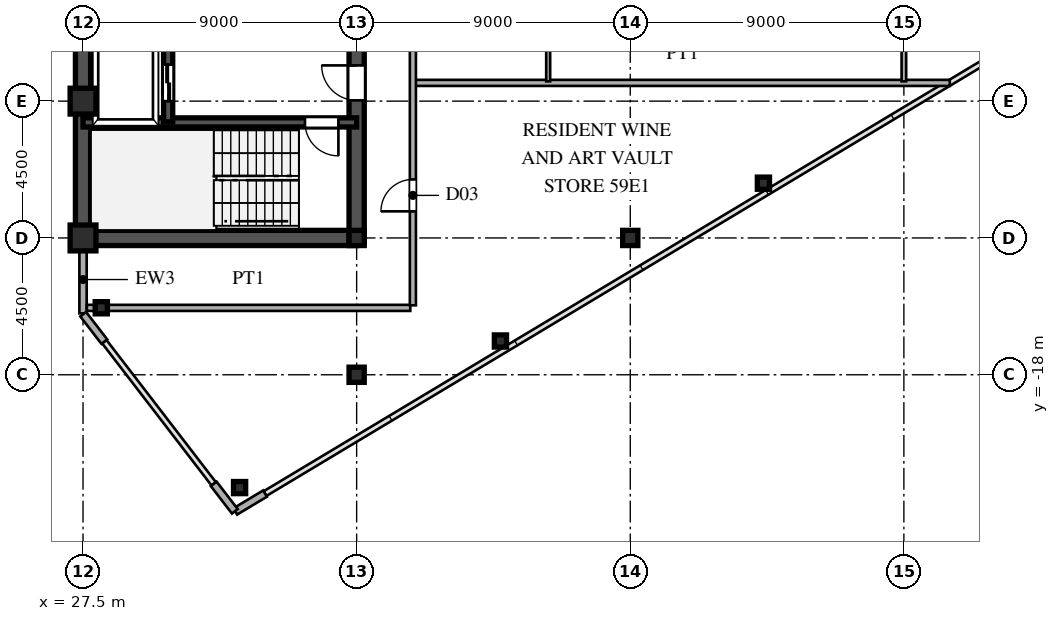
"""IFC4 building model, lengths in metres.
Left out: names, types, materials, properties, quantities, classifications, styles, units other than length and angle.
Written with IfcOpenShell. Run it as: python <this file> out.ifc"""

import sys

from ifc_helpers import new_model, si_unit, direction, frame, frame_2d, origin, origin_2d, place, context, subcontext, project, spatial, rectangle, hollow_rectangle, i_section, extrude, source, transform, mapped, element, fill, save


model = new_model("IFC4")
c1 = context("Model", 3, precision=1e-05, world=origin(), true_north=direction((0.0, 1.0)))
c2 = subcontext(c1, "Body", "Model", "MODEL_VIEW")
j1 = project(units=[si_unit("LENGTHUNIT", "METRE"), si_unit("PLANEANGLEUNIT", "RADIAN")], contexts=[c1])
p1 = place(None, origin())
s1 = spatial("IfcSite", under=j1, at=p1, CompositionType="ELEMENT")
p2 = place(p1, origin())
s2 = spatial("IfcBuilding", under=s1, at=p2, CompositionType="ELEMENT")
p3 = place(p2, frame((0.0, 0.0, 221.1)))
s3 = spatial("IfcBuildingStorey", under=s2, at=p3, CompositionType="ELEMENT", Elevation=221.1)
m1 = source(origin(), c2, "Body", "SweptSolid", [
    extrude(hollow_rectangle(XDim=0.85, YDim=0.85, WallThickness=0.036, at=origin_2d()), origin(), (0.0, 0.0, 1.0), 3.6),
])
for number, where, z_axis, x_axis in (
    (1, (27.5, -13.5, 0.0), (0.0, 0.0, 1.0), (1.0, 0.0, 0.0)),
    (2, (27.5, -9.0, 0.0), (0.0, 0.0, 1.0), (1.0, 0.0, 0.0)),
):
    element("IfcColumn", number, at=place(p3, frame(where, z_axis=z_axis, x_axis=x_axis)), inside=s3, PredefinedType="COLUMN", context=c2, shape_type="MappedRepresentation", body=[
        mapped(m1, transform((0.0, 0.0, 0.0), scale=1.0)),
    ])
m2 = source(origin(), c2, "Body", "SweptSolid", [
    extrude(i_section(OverallWidth=0.5, OverallDepth=0.5, WebThickness=0.02, FlangeThickness=0.032, at=origin_2d()), origin(), (0.0, 0.0, 1.0), 3.6),
])
for number, where, z_axis, x_axis in (
    (3, (36.5, -18.0, 0.0), (0.0, 0.0, 1.0), (1.0, 0.0, 0.0)),
    (4, (36.5, -13.5, 0.0), (0.0, 0.0, 1.0), (1.0, 0.0, 0.0)),
    (5, (45.5, -13.5, 0.0), (0.0, 0.0, 1.0), (1.0, 0.0, 0.0)),
):
    element("IfcColumn", number, at=place(p3, frame(where, z_axis=z_axis, x_axis=x_axis)), inside=s3, PredefinedType="COLUMN", context=c2, shape_type="MappedRepresentation", body=[
        mapped(m2, transform((0.0, 0.0, 0.0), scale=1.0)),
    ])
m3 = source(origin(), c2, "Body", "SweptSolid", [
    extrude(hollow_rectangle(XDim=0.4, YDim=0.4, WallThickness=0.016, at=origin_2d()), origin(), (0.0, 0.0, 1.0), 3.6),
])
for number, where, z_axis, x_axis in (
    (6, (32.65, -21.71, 0.0), (0.0, 0.0, 1.0), (1.0, 0.0, 0.0)),
    (7, (28.1, -15.796, 0.0), (0.0, 0.0, 1.0), (1.0, 0.0, 0.0)),
    (8, (41.23, -16.889, 0.0), (0.0, 0.0, 1.0), (1.0, 0.0, 0.0)),
    (9, (49.88, -11.699, 0.0), (0.0, 0.0, 1.0), (1.0, 0.0, 0.0)),
):
    element("IfcColumn", number, at=place(p3, frame(where, z_axis=z_axis, x_axis=x_axis)), inside=s3, PredefinedType="COLUMN", context=c2, shape_type="MappedRepresentation", body=[
        mapped(m3, transform((0.0, 0.0, 0.0), scale=1.0)),
    ])
p4 = place(p3, frame((32.509, -22.495, 0.0), z_axis=(0.0, 0.0, 1.0), x_axis=(0.85743623509, 0.514590228002, 0.0)))
e10 = element("IfcWall", 10, at=p4, inside=s3, PredefinedType="SOLIDWALL", context=c2, shape_type="SweptSolid", body=[
    extrude(rectangle(XDim=1.14, YDim=0.24, at=frame_2d((0.57, 0.0))), origin(), (0.0, 0.0, 1.0), 3.34),
])
p5 = place(p3, frame((27.5, -15.98, 0.0), z_axis=(0.0, 0.0, 1.0), x_axis=(0.0, 1.0, 0.0)))
e11 = element("IfcWall", 11, at=p5, inside=s3, PredefinedType="SOLIDWALL", context=c2, shape_type="SweptSolid", body=[
    extrude(rectangle(XDim=1.605, YDim=0.24, at=frame_2d((0.803, 0.0))), origin(), (0.0, 0.0, 1.0), 3.34),
])
p6 = place(p3, frame((27.5, -14.375, 0.0), z_axis=(0.0, 0.0, 1.0), x_axis=(0.0, 1.0, 0.0)))
e12 = element("IfcWall", 12, at=p6, inside=s3, PredefinedType="SOLIDWALL", context=c2, shape_type="SweptSolid", body=[
    extrude(rectangle(XDim=0.62, YDim=0.24, at=frame_2d((0.31, 0.0))), origin(), (0.0, 0.0, 1.0), 2.84),
])
for number, where, z_axis, x_axis in (
    (13, (27.506, -16.008, 0.0), (0.0, 0.0, 1.0), (0.61, -0.793, 0.0)),
    (14, (31.799, -21.588, 0.0), (0.0, 0.0, 1.0), (0.61, -0.793, 0.0)),
):
    element("IfcWall", number, at=place(p3, frame(where, z_axis=z_axis, x_axis=x_axis)), inside=s3, PredefinedType="SOLIDWALL", context=c2, shape_type="SweptSolid", body=[
        extrude(rectangle(XDim=1.14, YDim=0.24, at=frame_2d((0.57, 0.0))), origin(), (0.0, 0.0, 1.0), 3.34),
    ])
p7 = place(p3, frame((27.5, -13.5, 0.0), z_axis=(0.0, 0.0, 1.0), x_axis=(0.0, 1.0, 0.0)))
e15 = element("IfcWall", 15, at=p7, inside=s3, PredefinedType="SHEAR", context=c2, shape_type="SweptSolid", body=[
    extrude(rectangle(XDim=12.2, YDim=0.5, at=frame_2d((6.1, 0.0))), origin(), (0.0, 0.0, 1.0), 3.34),
])
p8 = place(p3, frame((27.5, -13.5, 0.0), z_axis=(0.0, 0.0, 1.0), x_axis=(1.0, 0.0, 0.0)))
e16 = element("IfcWall", 16, at=p8, inside=s3, PredefinedType="SHEAR", context=c2, shape_type="SweptSolid", body=[
    extrude(rectangle(XDim=9.0, YDim=0.5, at=frame_2d((4.5, 0.0))), origin(), (0.0, 0.0, 1.0), 3.34),
])
p9 = place(p3, frame((36.5, -13.65, 0.0), z_axis=(0.0, 0.0, 1.0), x_axis=(0.0, 1.0, 0.0)))
e17 = element("IfcWall", 17, at=p9, inside=s3, PredefinedType="SHEAR", context=c2, shape_type="SweptSolid", body=[
    extrude(rectangle(XDim=7.15, YDim=0.5, at=frame_2d((3.575, 0.0))), origin(), (0.0, 0.0, 1.0), 3.34),
])
p10 = place(p9, frame((4.675, 0.0, 0.0)))
e18 = element("IfcOpeningElement", 18, at=p10, cuts=e17, PredefinedType="OPENING", context=c2, shape_type="SweptSolid", body=[
    extrude(rectangle(XDim=1.15, YDim=2.2, at=frame_2d((0.575, 1.1))), frame((0.0, 0.26, 0.0), z_axis=(0.0, -1.0, 0.0), x_axis=(1.0, 0.0, 0.0)), (0.0, 0.0, 1.0), 0.52),
])
p11 = place(p3, frame((27.5, -9.7, 0.0), z_axis=(0.0, 0.0, 1.0), x_axis=(1.0, 0.0, 0.0)))
e19 = element("IfcWall", 19, at=p11, inside=s3, PredefinedType="SHEAR", context=c2, shape_type="SweptSolid", body=[
    extrude(rectangle(XDim=9.0, YDim=0.3, at=frame_2d((4.5, 0.0))), origin(), (0.0, 0.0, 1.0), 3.34),
])
p12 = place(p11, frame((7.3, 0.0, 0.0)))
e20 = element("IfcOpeningElement", 20, at=p12, cuts=e19, PredefinedType="OPENING", context=c2, shape_type="SweptSolid", body=[
    extrude(rectangle(XDim=1.1, YDim=2.2, at=frame_2d((0.55, 1.1))), frame((0.0, 0.16, 0.0), z_axis=(0.0, -1.0, 0.0), x_axis=(1.0, 0.0, 0.0)), (0.0, 0.0, 1.0), 0.32),
])
p13 = place(p3, frame((30.3, -9.68, 0.0), z_axis=(0.0, 0.0, 1.0), x_axis=(0.0, 1.0, 0.0)))
e21 = element("IfcWall", 21, at=p13, inside=s3, PredefinedType="SHEAR", context=c2, shape_type="SweptSolid", body=[
    extrude(rectangle(XDim=2.56, YDim=0.3, at=frame_2d((1.28, 0.0))), origin(), (0.0, 0.0, 1.0), 3.34),
])
p14 = place(p13, frame((0.68, 0.0, 0.0)))
e22 = element("IfcOpeningElement", 22, at=p14, cuts=e21, PredefinedType="OPENING", context=c2, shape_type="SweptSolid", body=[
    extrude(rectangle(XDim=1.2, YDim=2.25, at=frame_2d((0.6, 1.125))), frame((0.0, 0.16, 0.0), z_axis=(0.0, -1.0, 0.0), x_axis=(1.0, 0.0, 0.0)), (0.0, 0.0, 1.0), 0.32),
])
p15 = place(p3, frame((27.625, -15.8, 0.0), z_axis=(0.0, 0.0, 1.0), x_axis=(1.0, 0.0, 0.0)))
e23 = element("IfcWall", 23, at=p15, inside=s3, PredefinedType="PARTITIONING", context=c2, shape_type="SweptSolid", body=[
    extrude(rectangle(XDim=10.64, YDim=0.2, at=frame_2d((5.32, 0.0))), origin(), (0.0, 0.0, 1.0), 3.34),
])
p16 = place(p3, frame((38.43, -8.4, 0.0), z_axis=(0.0, 0.0, 1.0), x_axis=(1.0, 0.0, 0.0)))
e24 = element("IfcWall", 24, at=p16, inside=s3, PredefinedType="PARTITIONING", context=c2, shape_type="SweptSolid", body=[
    extrude(rectangle(XDim=17.58, YDim=0.2, at=frame_2d((8.79, 0.0))), origin(), (0.0, 0.0, 1.0), 3.34),
])
p17 = place(p3, frame((38.35, -15.715, 0.0), z_axis=(0.0, 0.0, 1.0), x_axis=(0.0, 1.0, 0.0)))
e25 = element("IfcWall", 25, at=p17, inside=s3, PredefinedType="PARTITIONING", context=c2, shape_type="SweptSolid", body=[
    extrude(rectangle(XDim=31.43, YDim=0.2, at=frame_2d((15.715, 0.0))), origin(), (0.0, 0.0, 1.0), 3.34),
])
p18 = place(p17, frame((3.09, 0.0, 0.0)))
e26 = element("IfcOpeningElement", 26, at=p18, cuts=e25, PredefinedType="OPENING", context=c2, shape_type="SweptSolid", body=[
    extrude(rectangle(XDim=1.05, YDim=2.25, at=frame_2d((0.525, 1.125))), frame((0.0, 0.11, 0.0), z_axis=(0.0, -1.0, 0.0), x_axis=(1.0, 0.0, 0.0)), (0.0, 0.0, 1.0), 0.22),
])
p19 = place(p17, frame((13.289, 0.0, 0.0)))
e27 = element("IfcOpeningElement", 27, at=p19, cuts=e25, PredefinedType="OPENING", context=c2, shape_type="SweptSolid", body=[
    extrude(rectangle(XDim=1.05, YDim=2.25, at=frame_2d((0.525, 1.125))), frame((0.0, 0.11, 0.0), z_axis=(0.0, -1.0, 0.0), x_axis=(1.0, 0.0, 0.0)), (0.0, 0.0, 1.0), 0.22),
])
p20 = place(p17, frame((25.59, 0.0, 0.0)))
e28 = element("IfcOpeningElement", 28, at=p20, cuts=e25, PredefinedType="OPENING", context=c2, shape_type="SweptSolid", body=[
    extrude(rectangle(XDim=1.05, YDim=2.25, at=frame_2d((0.525, 1.125))), frame((0.0, 0.11, 0.0), z_axis=(0.0, -1.0, 0.0), x_axis=(1.0, 0.0, 0.0)), (0.0, 0.0, 1.0), 0.22),
])
p21 = place(p3, frame((42.8, -8.35, 0.0), z_axis=(0.0, 0.0, 1.0), x_axis=(0.0, 1.0, 0.0)))
e29 = element("IfcWall", 29, at=p21, inside=s3, PredefinedType="PARTITIONING", context=c2, shape_type="SweptSolid", body=[
    extrude(rectangle(XDim=8.833, YDim=0.13, at=frame_2d((4.417, 0.0))), origin(), (0.0, 0.0, 1.0), 3.34),
])
p22 = place(p21, frame((6.175, 0.0, 0.0)))
e30 = element("IfcOpeningElement", 30, at=p22, cuts=e29, PredefinedType="OPENING", context=c2, shape_type="SweptSolid", body=[
    extrude(rectangle(XDim=0.95, YDim=2.15, at=frame_2d((0.475, 1.075))), frame((0.0, 0.075, 0.0), z_axis=(0.0, -1.0, 0.0), x_axis=(1.0, 0.0, 0.0)), (0.0, 0.0, 1.0), 0.15),
])
p23 = place(p3, frame((54.5, -8.35, 0.0), z_axis=(0.0, 0.0, 1.0), x_axis=(0.0, 1.0, 0.0)))
e31 = element("IfcWall", 31, at=p23, inside=s3, PredefinedType="PARTITIONING", context=c2, shape_type="SweptSolid", body=[
    extrude(rectangle(XDim=3.83, YDim=0.15, at=frame_2d((1.915, 0.0))), origin(), (0.0, 0.0, 1.0), 3.34),
])
m4 = source(origin(), c2, "Body", "SweptSolid", [
    extrude(rectangle(XDim=1.15, YDim=2.2, at=frame_2d((0.575, 1.1))), frame((0.0, 0.025, 0.0), z_axis=(0.0, -1.0, 0.0), x_axis=(1.0, 0.0, 0.0)), (0.0, 0.0, 1.0), 0.05),
])
p24 = place(p10, origin())
e32 = element("IfcDoor", 32, at=p24, inside=s3, OperationType="SINGLE_SWING_RIGHT", PredefinedType="DOOR", context=c2, shape_type="MappedRepresentation", body=[
    mapped(m4, transform((0.0, 0.0, 0.0), scale=1.0)),
])
fill(e18, e32)
m5 = source(origin(), c2, "Body", "SweptSolid", [
    extrude(rectangle(XDim=1.1, YDim=2.2, at=frame_2d((0.55, 1.1))), frame((0.0, 0.025, 0.0), z_axis=(0.0, -1.0, 0.0), x_axis=(1.0, 0.0, 0.0)), (0.0, 0.0, 1.0), 0.05),
])
p25 = place(p12, frame((1.1, 0.0, 0.0), z_axis=(0.0, 0.0, 1.0), x_axis=(-1.0, 0.0, 0.0)))
e33 = element("IfcDoor", 33, at=p25, inside=s3, OperationType="SINGLE_SWING_RIGHT", PredefinedType="DOOR", context=c2, shape_type="MappedRepresentation", body=[
    mapped(m5, transform((0.0, 0.0, 0.0), scale=1.0)),
])
fill(e20, e33)
m6 = source(origin(), c2, "Body", "SweptSolid", [
    extrude(rectangle(XDim=1.2, YDim=2.25, at=frame_2d((0.6, 1.125))), frame((0.0, 0.025, 0.0), z_axis=(0.0, -1.0, 0.0), x_axis=(1.0, 0.0, 0.0)), (0.0, 0.0, 1.0), 0.05),
])
p26 = place(p14, origin())
e34 = element("IfcDoor", 34, at=p26, inside=s3, OperationType="DOUBLE_DOOR_SLIDING", PredefinedType="DOOR", context=c2, shape_type="MappedRepresentation", body=[
    mapped(m6, transform((0.0, 0.0, 0.0), scale=1.0)),
])
fill(e22, e34)
m7 = source(origin(), c2, "Body", "SweptSolid", [
    extrude(rectangle(XDim=1.05, YDim=2.25, at=frame_2d((0.525, 1.125))), frame((0.0, 0.025, 0.0), z_axis=(0.0, -1.0, 0.0), x_axis=(1.0, 0.0, 0.0)), (0.0, 0.0, 1.0), 0.05),
])
p27 = place(p18, origin())
e35 = element("IfcDoor", 35, at=p27, inside=s3, OperationType="SINGLE_SWING_LEFT", PredefinedType="DOOR", context=c2, shape_type="MappedRepresentation", body=[
    mapped(m7, transform((0.0, 0.0, 0.0), scale=1.0)),
])
fill(e26, e35)
save(model, sys.argv[1])
